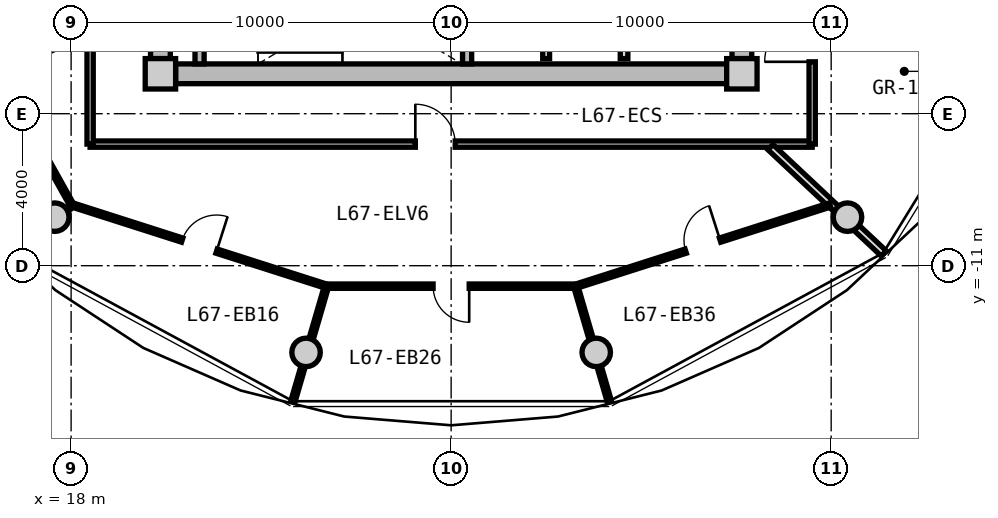
"""IFC4 building model, lengths in metres.
Left out: names, types, materials, properties, quantities, classifications, styles, units other than length and angle.
Written with IfcOpenShell. Run it as: python <this file> out.ifc"""

import sys

from ifc_helpers import new_model, si_unit, direction, frame, frame_2d, origin, origin_2d, place, context, subcontext, project, spatial, rectangle, circle, extrude, source, transform, mapped, element, fill, save


model = new_model("IFC4")
c1 = context("Model", 3, precision=1e-05, world=origin(), true_north=direction((0.0, 1.0)))
c2 = subcontext(c1, "Body", "Model", "MODEL_VIEW")
j1 = project(units=[si_unit("LENGTHUNIT", "METRE"), si_unit("PLANEANGLEUNIT", "RADIAN")], contexts=[c1])
p1 = place(None, origin())
s1 = spatial("IfcSite", under=j1, at=p1, CompositionType="ELEMENT")
p2 = place(p1, origin())
s2 = spatial("IfcBuilding", under=s1, at=p2, CompositionType="ELEMENT")
p3 = place(p2, frame((0.0, 0.0, 216.95)))
s3 = spatial("IfcBuildingStorey", under=s2, at=p3, CompositionType="ELEMENT", Elevation=216.95)
m1 = source(origin(), c2, "Body", "SweptSolid", [
    extrude(rectangle(XDim=0.8, YDim=0.8, at=origin_2d()), origin(), (0.0, 0.0, 1.0), 3.05),
])
for number, where, z_axis, x_axis in (
    (1, (20.35, -5.95, 0.0), (0.0, 0.0, 1.0), (1.0, 0.0, 0.0)),
    (2, (35.65, -5.95, 0.0), (0.0, 0.0, 1.0), (1.0, 0.0, 0.0)),
):
    element("IfcColumn", number, at=place(p3, frame(where, z_axis=z_axis, x_axis=x_axis)), inside=s3, PredefinedType="COLUMN", context=c2, shape_type="MappedRepresentation", body=[
        mapped(m1, transform((0.0, 0.0, 0.0), x_axis=(1.0, 0.0, 0.0), y_axis=(0.0, 1.0, 0.0), z_axis=(0.0, 0.0, 1.0), scale=1.0)),
    ])
m2 = source(origin(), c2, "Body", "SweptSolid", [
    extrude(rectangle(XDim=14.5, YDim=0.52, at=frame_2d((7.25, 0.0))), origin(), (0.0, 0.0, 1.0), 2.76),
])
p4 = place(p3, frame((35.25, -5.95, 0.0), z_axis=(0.0, 0.0, 1.0), x_axis=(-1.0, 0.0, 0.0)))
e3 = element("IfcWall", 3, at=p4, inside=s3, PredefinedType="SHEAR", context=c2, shape_type="MappedRepresentation", body=[
    mapped(m2, transform((0.0, 0.0, 0.0), x_axis=(1.0, 0.0, 0.0), y_axis=(0.0, 1.0, 0.0), z_axis=(0.0, 0.0, 1.0), scale=1.0)),
])
m3 = source(origin(), c2, "Body", "SweptSolid", [
    extrude(rectangle(XDim=11.1, YDim=0.52, at=frame_2d((5.55, 0.0))), origin(), (0.0, 0.0, 1.0), 2.76),
])
p5 = place(p3, frame((20.35, -5.55, 0.0), z_axis=(0.0, 0.0, 1.0), x_axis=(0.0, 1.0, 0.0)))
e4 = element("IfcWall", 4, at=p5, inside=s3, PredefinedType="SHEAR", context=c2, shape_type="MappedRepresentation", body=[
    mapped(m3, transform((0.0, 0.0, 0.0), x_axis=(1.0, 0.0, 0.0), y_axis=(0.0, 1.0, 0.0), z_axis=(0.0, 0.0, 1.0), scale=1.0)),
])
p6 = place(p5, frame((3.8, 0.0, 0.0)))
e5 = element("IfcOpeningElement", 5, at=p6, cuts=e4, PredefinedType="OPENING", context=c2, shape_type="SweptSolid", body=[
    extrude(rectangle(XDim=1.2, YDim=2.15, at=frame_2d((0.6, 1.075))), frame((0.0, 0.27, 0.0), z_axis=(0.0, -1.0, 0.0), x_axis=(1.0, 0.0, 0.0)), (0.0, 0.0, 1.0), 0.54),
])
p7 = place(p3, frame((35.65, 5.55, 0.0), z_axis=(0.0, 0.0, 1.0), x_axis=(0.0, -1.0, 0.0)))
e6 = element("IfcWall", 6, at=p7, inside=s3, PredefinedType="SHEAR", context=c2, shape_type="MappedRepresentation", body=[
    mapped(m3, transform((0.0, 0.0, 0.0), x_axis=(1.0, 0.0, 0.0), y_axis=(0.0, 1.0, 0.0), z_axis=(0.0, 0.0, 1.0), scale=1.0)),
])
p8 = place(p7, frame((5.65, 0.0, 0.0)))
e7 = element("IfcOpeningElement", 7, at=p8, cuts=e6, PredefinedType="OPENING", context=c2, shape_type="SweptSolid", body=[
    extrude(rectangle(XDim=1.2, YDim=2.15, at=frame_2d((0.6, 1.075))), frame((0.0, 0.27, 0.0), z_axis=(0.0, -1.0, 0.0), x_axis=(1.0, 0.0, 0.0)), (0.0, 0.0, 1.0), 0.54),
])
m4 = source(origin(), c2, "Body", "SweptSolid", [
    extrude(circle(Radius=0.375, at=origin_2d()), origin(), (0.0, 0.0, 1.0), 3.05),
])
for number, where, z_axis, x_axis in (
    (8, (17.57, -9.723, 0.0), (0.0, 0.0, 1.0), (1.0, 0.0, 0.0)),
    (9, (24.182, -13.281, 0.0), (0.0, 0.0, 1.0), (1.0, 0.0, 0.0)),
    (10, (31.818, -13.281, 0.0), (0.0, 0.0, 1.0), (1.0, 0.0, 0.0)),
    (11, (38.43, -9.723, 0.0), (0.0, 0.0, 1.0), (1.0, 0.0, 0.0)),
):
    element("IfcColumn", number, at=place(p3, frame(where, z_axis=z_axis, x_axis=x_axis)), inside=s3, PredefinedType="COLUMN", context=c2, shape_type="MappedRepresentation", body=[
        mapped(m4, transform((0.0, 0.0, 0.0), x_axis=(1.0, 0.0, 0.0), y_axis=(0.0, 1.0, 0.0), z_axis=(0.0, 0.0, 1.0), scale=1.0)),
    ])
m5 = source(origin(), c2, "Body", "SweptSolid", [
    extrude(rectangle(XDim=3.24, YDim=0.24, at=frame_2d((1.62, 0.0))), origin(), (0.0, 0.0, 1.0), 2.76),
])
for number, where, z_axis, x_axis in (
    (12, (21.38, -5.69, 0.0), (0.0, 0.0, 1.0), (0.0, 1.0, 0.0)),
    (13, (28.42, -5.69, 0.0), (0.0, 0.0, 1.0), (0.0, 1.0, 0.0)),
):
    element("IfcWall", number, at=place(p3, frame(where, z_axis=z_axis, x_axis=x_axis)), inside=s3, PredefinedType="PARTITIONING", context=c2, shape_type="MappedRepresentation", body=[
        mapped(m5, transform((0.0, 0.0, 0.0), x_axis=(1.0, 0.0, 0.0), y_axis=(0.0, 1.0, 0.0), z_axis=(0.0, 0.0, 1.0), scale=1.0)),
    ])
m6 = source(origin(), c2, "Body", "SweptSolid", [
    extrude(rectangle(XDim=3.8, YDim=0.2, at=frame_2d((1.9, 0.0))), origin(), (0.0, 0.0, 1.0), 2.745),
])
p9 = place(p3, frame((32.55, -5.55, 0.0), z_axis=(0.0, 0.0, 1.0), x_axis=(0.0, 1.0, 0.0)))
e14 = element("IfcWall", 14, at=p9, inside=s3, PredefinedType="PARTITIONING", context=c2, shape_type="MappedRepresentation", body=[
    mapped(m6, transform((0.0, 0.0, 0.0), x_axis=(1.0, 0.0, 0.0), y_axis=(0.0, 1.0, 0.0), z_axis=(0.0, 0.0, 1.0), scale=1.0)),
])
m7 = source(origin(), c2, "Body", "SweptSolid", [
    extrude(rectangle(XDim=4.2, YDim=0.18, at=frame_2d((2.1, 0.0))), origin(), (0.0, 0.0, 1.0), 2.745),
])
p10 = place(p3, frame((30.5, -5.55, 0.0), z_axis=(0.0, 0.0, 1.0), x_axis=(0.0, 1.0, 0.0)))
e15 = element("IfcWall", 15, at=p10, inside=s3, PredefinedType="PARTITIONING", context=c2, shape_type="MappedRepresentation", body=[
    mapped(m7, transform((0.0, 0.0, 0.0), x_axis=(1.0, 0.0, 0.0), y_axis=(0.0, 1.0, 0.0), z_axis=(0.0, 0.0, 1.0), scale=1.0)),
])
m8 = source(origin(), c2, "Body", "SweptSolid", [
    extrude(rectangle(XDim=19.0, YDim=0.165, at=frame_2d((9.5, 0.0))), origin(), (0.0, 0.0, 1.0), 2.745),
])
p11 = place(p3, frame((37.5, -7.8, 0.0), z_axis=(0.0, 0.0, 1.0), x_axis=(-1.0, 0.0, 0.0)))
e16 = element("IfcWall", 16, at=p11, inside=s3, PredefinedType="PARTITIONING", context=c2, shape_type="MappedRepresentation", body=[
    mapped(m8, transform((0.0, 0.0, 0.0), x_axis=(1.0, 0.0, 0.0), y_axis=(0.0, 1.0, 0.0), z_axis=(0.0, 0.0, 1.0), scale=1.0)),
])
p12 = place(p11, frame((9.392, 0.0, 0.0)))
e17 = element("IfcOpeningElement", 17, at=p12, cuts=e16, PredefinedType="OPENING", context=c2, shape_type="SweptSolid", body=[
    extrude(rectangle(XDim=1.05, YDim=2.15, at=frame_2d((0.525, 1.075))), frame((0.0, 0.093, 0.0), z_axis=(0.0, -1.0, 0.0), x_axis=(1.0, 0.0, 0.0)), (0.0, 0.0, 1.0), 0.185),
])
m9 = source(origin(), c2, "Body", "SweptSolid", [
    extrude(rectangle(XDim=6.88, YDim=0.165, at=frame_2d((3.44, 0.0))), origin(), (0.0, 0.0, 1.0), 2.745),
])
p13 = place(p3, frame((18.5, -7.8, 0.0), z_axis=(0.0, 0.0, 1.0), x_axis=(0.0, 1.0, 0.0)))
e18 = element("IfcWall", 18, at=p13, inside=s3, PredefinedType="PARTITIONING", context=c2, shape_type="MappedRepresentation", body=[
    mapped(m9, transform((0.0, 0.0, 0.0), x_axis=(1.0, 0.0, 0.0), y_axis=(0.0, 1.0, 0.0), z_axis=(0.0, 0.0, 1.0), scale=1.0)),
])
p14 = place(p3, frame((37.5, -0.92, 0.0), z_axis=(0.0, 0.0, 1.0), x_axis=(0.0, -1.0, 0.0)))
e19 = element("IfcWall", 19, at=p14, inside=s3, PredefinedType="PARTITIONING", context=c2, shape_type="MappedRepresentation", body=[
    mapped(m9, transform((0.0, 0.0, 0.0), x_axis=(1.0, 0.0, 0.0), y_axis=(0.0, 1.0, 0.0), z_axis=(0.0, 0.0, 1.0), scale=1.0)),
])
p15 = place(p14, frame((3.464, 0.0, 0.0)))
e20 = element("IfcOpeningElement", 20, at=p15, cuts=e19, PredefinedType="OPENING", context=c2, shape_type="SweptSolid", body=[
    extrude(rectangle(XDim=1.25, YDim=2.2, at=frame_2d((0.625, 1.1))), frame((0.0, 0.093, 0.0), z_axis=(0.0, -1.0, 0.0), x_axis=(1.0, 0.0, 0.0)), (0.0, 0.0, 1.0), 0.185),
])
m10 = source(origin(), c2, "Body", "SweptSolid", [
    extrude(rectangle(XDim=4.089, YDim=0.19, at=frame_2d((2.044, 0.0))), origin(), (0.0, 0.0, 1.0), 2.345),
])
p16 = place(p3, frame((36.402, -7.88, 0.0), z_axis=(0.0, 0.0, 1.0), x_axis=(0.729401273609, -0.684086092577, 0.0)))
e21 = element("IfcWall", 21, at=p16, inside=s3, PredefinedType="PARTITIONING", context=c2, shape_type="MappedRepresentation", body=[
    mapped(m10, transform((0.0, 0.0, 0.0), x_axis=(1.0, 0.0, 0.0), y_axis=(0.0, 1.0, 0.0), z_axis=(0.0, 0.0, 1.0), scale=1.0)),
])
m11 = source(origin(), c2, "Body", "SweptSolid", [
    extrude(rectangle(XDim=7.024, YDim=0.115, at=frame_2d((3.512, 0.0))), origin(), (0.0, 0.0, 1.0), 2.745),
])
p17 = place(p3, frame((18.03, -9.401, 0.0), z_axis=(0.0, 0.0, 1.0), x_axis=(0.952454006655, -0.304682400552, 0.0)))
e22 = element("IfcWall", 22, at=p17, inside=s3, PredefinedType="PARTITIONING", context=c2, shape_type="MappedRepresentation", body=[
    mapped(m11, transform((0.0, 0.0, 0.0), x_axis=(1.0, 0.0, 0.0), y_axis=(0.0, 1.0, 0.0), z_axis=(0.0, 0.0, 1.0), scale=1.0)),
])
p18 = place(p17, frame((3.037, 0.0, 0.0)))
e23 = element("IfcOpeningElement", 23, at=p18, cuts=e22, PredefinedType="OPENING", context=c2, shape_type="SweptSolid", body=[
    extrude(rectangle(XDim=0.95, YDim=2.1, at=frame_2d((0.475, 1.05))), frame((0.0, 0.067, 0.0), z_axis=(0.0, -1.0, 0.0), x_axis=(1.0, 0.0, 0.0)), (0.0, 0.0, 1.0), 0.135),
])
m12 = source(origin(), c2, "Body", "SweptSolid", [
    extrude(rectangle(XDim=1.905, YDim=0.115, at=frame_2d((0.953, 0.0))), origin(), (0.0, 0.0, 1.0), 2.345),
])
p19 = place(p3, frame((18.03, -9.401, 0.0), z_axis=(0.0, 0.0, 1.0), x_axis=(-0.742624708137, -0.669707804094, 0.0)))
e24 = element("IfcWall", 24, at=p19, inside=s3, PredefinedType="PARTITIONING", context=c2, shape_type="MappedRepresentation", body=[
    mapped(m12, transform((0.0, 0.0, 0.0), x_axis=(1.0, 0.0, 0.0), y_axis=(0.0, 1.0, 0.0), z_axis=(0.0, 0.0, 1.0), scale=1.0)),
])
m13 = source(origin(), c2, "Body", "SweptSolid", [
    extrude(rectangle(XDim=6.558, YDim=0.115, at=frame_2d((3.279, 0.0))), origin(), (0.0, 0.0, 1.0), 2.745),
])
p20 = place(p3, frame((24.721, -11.539, 0.0), z_axis=(0.0, 0.0, 1.0), x_axis=(1.0, 0.0, 0.0)))
e25 = element("IfcWall", 25, at=p20, inside=s3, PredefinedType="PARTITIONING", context=c2, shape_type="MappedRepresentation", body=[
    mapped(m13, transform((0.0, 0.0, 0.0), x_axis=(1.0, 0.0, 0.0), y_axis=(0.0, 1.0, 0.0), z_axis=(0.0, 0.0, 1.0), scale=1.0)),
])
p21 = place(p20, frame((2.804, 0.0, 0.0)))
e26 = element("IfcOpeningElement", 26, at=p21, cuts=e25, PredefinedType="OPENING", context=c2, shape_type="SweptSolid", body=[
    extrude(rectangle(XDim=0.95, YDim=2.1, at=frame_2d((0.475, 1.05))), frame((0.0, 0.067, 0.0), z_axis=(0.0, -1.0, 0.0), x_axis=(1.0, 0.0, 0.0)), (0.0, 0.0, 1.0), 0.135),
])
m14 = source(origin(), c2, "Body", "SweptSolid", [
    extrude(rectangle(XDim=3.173, YDim=0.115, at=frame_2d((1.587, 0.0))), origin(), (0.0, 0.0, 1.0), 2.345),
])
p22 = place(p3, frame((24.721, -11.539, 0.0), z_axis=(0.0, 0.0, 1.0), x_axis=(-0.279878875918, -0.960035319566, 0.0)))
e27 = element("IfcWall", 27, at=p22, inside=s3, PredefinedType="PARTITIONING", context=c2, shape_type="MappedRepresentation", body=[
    mapped(m14, transform((0.0, 0.0, 0.0), x_axis=(1.0, 0.0, 0.0), y_axis=(0.0, 1.0, 0.0), z_axis=(0.0, 0.0, 1.0), scale=1.0)),
])
p23 = place(p3, frame((31.28, -11.542, 0.0), z_axis=(0.0, 0.0, 1.0), x_axis=(0.952454006655, 0.304682400552, 0.0)))
e28 = element("IfcWall", 28, at=p23, inside=s3, PredefinedType="PARTITIONING", context=c2, shape_type="MappedRepresentation", body=[
    mapped(m11, transform((0.0, 0.0, 0.0), x_axis=(1.0, 0.0, 0.0), y_axis=(0.0, 1.0, 0.0), z_axis=(0.0, 0.0, 1.0), scale=1.0)),
])
p24 = place(p23, frame((3.037, 0.0, 0.0)))
e29 = element("IfcOpeningElement", 29, at=p24, cuts=e28, PredefinedType="OPENING", context=c2, shape_type="SweptSolid", body=[
    extrude(rectangle(XDim=0.95, YDim=2.1, at=frame_2d((0.475, 1.05))), frame((0.0, 0.067, 0.0), z_axis=(0.0, -1.0, 0.0), x_axis=(1.0, 0.0, 0.0)), (0.0, 0.0, 1.0), 0.135),
])
m15 = source(origin(), c2, "Body", "SweptSolid", [
    extrude(rectangle(XDim=3.171, YDim=0.115, at=frame_2d((1.585, 0.0))), origin(), (0.0, 0.0, 1.0), 2.345),
])
p25 = place(p3, frame((31.28, -11.542, 0.0), z_axis=(0.0, 0.0, 1.0), x_axis=(0.279893554029, -0.960031040338, 0.0)))
e30 = element("IfcWall", 30, at=p25, inside=s3, PredefinedType="PARTITIONING", context=c2, shape_type="MappedRepresentation", body=[
    mapped(m15, transform((0.0, 0.0, 0.0), x_axis=(1.0, 0.0, 0.0), y_axis=(0.0, 1.0, 0.0), z_axis=(0.0, 0.0, 1.0), scale=1.0)),
])
m16 = source(origin(), c2, "Body", "SweptSolid", [
    extrude(rectangle(XDim=1.638, YDim=0.14, at=frame_2d((0.819, 0.0))), origin(), (0.0, 0.0, 1.0), 2.745),
])
p26 = place(p3, frame((18.47, -4.778, 0.0), z_axis=(0.0, 0.0, 1.0), x_axis=(-0.893919977945, -0.448226586707, 0.0)))
e31 = element("IfcWall", 31, at=p26, inside=s3, PredefinedType="PARTITIONING", context=c2, shape_type="MappedRepresentation", body=[
    mapped(m16, transform((0.0, 0.0, 0.0), x_axis=(1.0, 0.0, 0.0), y_axis=(0.0, 1.0, 0.0), z_axis=(0.0, 0.0, 1.0), scale=1.0)),
])
m17 = source(origin(), c2, "Body", "SweptSolid", [
    extrude(rectangle(XDim=3.493, YDim=0.115, at=frame_2d((1.746, 0.0))), origin(), (0.0, 0.0, 1.0), 2.745),
])
p27 = place(p3, frame((16.318, -6.36, 0.0), z_axis=(0.0, 0.0, 1.0), x_axis=(0.487896553961, -0.872901456427, 0.0)))
e32 = element("IfcWall", 32, at=p27, inside=s3, PredefinedType="PARTITIONING", context=c2, shape_type="MappedRepresentation", body=[
    mapped(m17, transform((0.0, 0.0, 0.0), x_axis=(1.0, 0.0, 0.0), y_axis=(0.0, 1.0, 0.0), z_axis=(0.0, 0.0, 1.0), scale=1.0)),
])
p28 = place(p27, frame((1.271, 0.0, 0.0)))
e33 = element("IfcOpeningElement", 33, at=p28, cuts=e32, PredefinedType="OPENING", context=c2, shape_type="SweptSolid", body=[
    extrude(rectangle(XDim=0.95, YDim=2.1, at=frame_2d((0.475, 1.05))), frame((0.0, 0.067, 0.0), z_axis=(0.0, -1.0, 0.0), x_axis=(1.0, 0.0, 0.0)), (0.0, 0.0, 1.0), 0.135),
])
m18 = source(origin(), c2, "Body", "SweptSolid", [
    extrude(rectangle(XDim=1.05, YDim=2.15, at=frame_2d((0.525, 1.075))), frame((0.0, 0.025, 0.0), z_axis=(0.0, -1.0, 0.0), x_axis=(1.0, 0.0, 0.0)), (0.0, 0.0, 1.0), 0.05),
])
p29 = place(p12, frame((1.05, 0.0, 0.0), z_axis=(0.0, 0.0, 1.0), x_axis=(-1.0, 0.0, 0.0)))
e34 = element("IfcDoor", 34, at=p29, inside=s3, OperationType="SINGLE_SWING_LEFT", PredefinedType="DOOR", context=c2, shape_type="MappedRepresentation", body=[
    mapped(m18, transform((0.0, 0.0, 0.0), x_axis=(1.0, 0.0, 0.0), y_axis=(0.0, 1.0, 0.0), z_axis=(0.0, 0.0, 1.0), scale=1.0)),
])
fill(e17, e34)
m19 = source(origin(), c2, "Body", "SweptSolid", [
    extrude(rectangle(XDim=0.95, YDim=2.1, at=frame_2d((0.475, 1.05))), frame((0.0, 0.025, 0.0), z_axis=(0.0, -1.0, 0.0), x_axis=(1.0, 0.0, 0.0)), (0.0, 0.0, 1.0), 0.05),
])
p30 = place(p18, origin())
e35 = element("IfcDoor", 35, at=p30, inside=s3, OperationType="SINGLE_SWING_RIGHT", PredefinedType="DOOR", context=c2, shape_type="MappedRepresentation", body=[
    mapped(m19, transform((0.0, 0.0, 0.0), x_axis=(1.0, 0.0, 0.0), y_axis=(0.0, 1.0, 0.0), z_axis=(0.0, 0.0, 1.0), scale=1.0)),
])
fill(e23, e35)
p31 = place(p21, frame((0.95, 0.0, 0.0), z_axis=(0.0, 0.0, 1.0), x_axis=(-1.0, 0.0, 0.0)))
e36 = element("IfcDoor", 36, at=p31, inside=s3, OperationType="SINGLE_SWING_LEFT", PredefinedType="DOOR", context=c2, shape_type="MappedRepresentation", body=[
    mapped(m19, transform((0.0, 0.0, 0.0), x_axis=(1.0, 0.0, 0.0), y_axis=(0.0, 1.0, 0.0), z_axis=(0.0, 0.0, 1.0), scale=1.0)),
])
fill(e26, e36)
p32 = place(p24, origin())
e37 = element("IfcDoor", 37, at=p32, inside=s3, OperationType="SINGLE_SWING_RIGHT", PredefinedType="DOOR", context=c2, shape_type="MappedRepresentation", body=[
    mapped(m19, transform((0.0, 0.0, 0.0), x_axis=(1.0, 0.0, 0.0), y_axis=(0.0, 1.0, 0.0), z_axis=(0.0, 0.0, 1.0), scale=1.0)),
])
fill(e29, e37)
m20 = source(origin(), c2, "Body", "SweptSolid", [
    extrude(rectangle(XDim=1.25, YDim=2.2, at=frame_2d((0.625, 1.1))), frame((0.0, 0.025, 0.0), z_axis=(0.0, -1.0, 0.0), x_axis=(1.0, 0.0, 0.0)), (0.0, 0.0, 1.0), 0.05),
])
p33 = place(p15, frame((1.25, 0.0, 0.0), z_axis=(0.0, 0.0, 1.0), x_axis=(-1.0, 0.0, 0.0)))
e38 = element("IfcDoor", 38, at=p33, inside=s3, OperationType="SINGLE_SWING_LEFT", PredefinedType="DOOR", context=c2, shape_type="MappedRepresentation", body=[
    mapped(m20, transform((0.0, 0.0, 0.0), x_axis=(1.0, 0.0, 0.0), y_axis=(0.0, 1.0, 0.0), z_axis=(0.0, 0.0, 1.0), scale=1.0)),
])
fill(e20, e38)
save(model, sys.argv[1])
